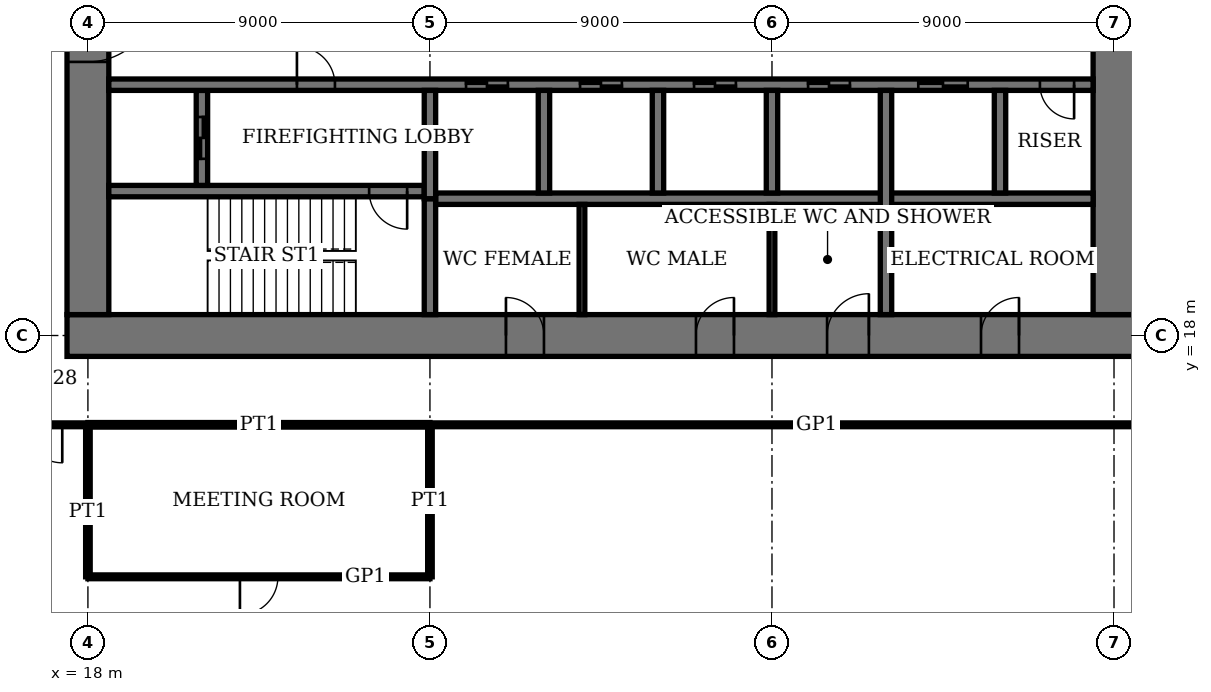
"""IFC4 building model, lengths in metres.
Left out: names, types, materials, properties, quantities, classifications, styles, units other than length and angle.
Written with IfcOpenShell. Run it as: python <this file> out.ifc"""

import sys

from ifc_helpers import new_model, si_unit, direction, frame, frame_2d, origin, place, context, subcontext, project, spatial, rectangle, extrude, element, fill, save


model = new_model("IFC4")
c1 = context("Model", 3, precision=1e-05, world=origin(), true_north=direction((0.0, 1.0)))
c2 = subcontext(c1, "Body", "Model", "MODEL_VIEW")
j1 = project(units=[si_unit("LENGTHUNIT", "METRE"), si_unit("PLANEANGLEUNIT", "RADIAN")], contexts=[c1])
p1 = place(None, origin())
s1 = spatial("IfcSite", under=j1, at=p1, CompositionType="ELEMENT")
p2 = place(p1, origin())
s2 = spatial("IfcBuilding", under=s1, at=p2, CompositionType="ELEMENT")
p3 = place(p2, frame((0.0, 0.0, 39.8)))
s3 = spatial("IfcBuildingStorey", under=s2, at=p3, CompositionType="ELEMENT", Elevation=39.8)
p4 = place(p3, frame((17.45, 18.0, 0.0), z_axis=(0.0, 0.0, 1.0), x_axis=(1.0, 0.0, 0.0)))
e1 = element("IfcWall", 1, at=p4, inside=s3, PredefinedType="SHEAR", context=c2, shape_type="SweptSolid", body=[
    extrude(rectangle(XDim=28.1, YDim=1.1, at=frame_2d((14.05, 0.0))), origin(), (0.0, 0.0, 1.0), 4.0),
])
p5 = place(p4, frame((11.55, 0.0, 0.0)))
e2 = element("IfcOpeningElement", 2, at=p5, cuts=e1, PredefinedType="OPENING", context=c2, shape_type="SweptSolid", body=[
    extrude(rectangle(XDim=1.0, YDim=2.4, at=frame_2d((0.5, 1.2))), frame((0.0, 0.56, 0.0), z_axis=(0.0, -1.0, 0.0), x_axis=(1.0, 0.0, 0.0)), (0.0, 0.0, 1.0), 1.12),
])
p6 = place(p4, frame((16.55, 0.0, 0.0)))
e3 = element("IfcOpeningElement", 3, at=p6, cuts=e1, PredefinedType="OPENING", context=c2, shape_type="SweptSolid", body=[
    extrude(rectangle(XDim=1.0, YDim=2.4, at=frame_2d((0.5, 1.2))), frame((0.0, 0.56, 0.0), z_axis=(0.0, -1.0, 0.0), x_axis=(1.0, 0.0, 0.0)), (0.0, 0.0, 1.0), 1.12),
])
p7 = place(p4, frame((20.0, 0.0, 0.0)))
e4 = element("IfcOpeningElement", 4, at=p7, cuts=e1, PredefinedType="OPENING", context=c2, shape_type="SweptSolid", body=[
    extrude(rectangle(XDim=1.1, YDim=2.4, at=frame_2d((0.55, 1.2))), frame((0.0, 0.56, 0.0), z_axis=(0.0, -1.0, 0.0), x_axis=(1.0, 0.0, 0.0)), (0.0, 0.0, 1.0), 1.12),
])
p8 = place(p4, frame((24.05, 0.0, 0.0)))
e5 = element("IfcOpeningElement", 5, at=p8, cuts=e1, PredefinedType="OPENING", context=c2, shape_type="SweptSolid", body=[
    extrude(rectangle(XDim=1.0, YDim=2.4, at=frame_2d((0.5, 1.2))), frame((0.0, 0.56, 0.0), z_axis=(0.0, -1.0, 0.0), x_axis=(1.0, 0.0, 0.0)), (0.0, 0.0, 1.0), 1.12),
])
p9 = place(p3, frame((18.0, 35.45, 0.0), z_axis=(0.0, 0.0, 1.0), x_axis=(0.0, -1.0, 0.0)))
e6 = element("IfcWall", 6, at=p9, inside=s3, PredefinedType="SHEAR", context=c2, shape_type="SweptSolid", body=[
    extrude(rectangle(XDim=16.9, YDim=1.1, at=frame_2d((8.45, 0.0))), origin(), (0.0, 0.0, 1.0), 4.0),
])
p10 = place(p9, frame((8.45, 0.0, 0.0)))
e7 = element("IfcOpeningElement", 7, at=p10, cuts=e6, PredefinedType="OPENING", context=c2, shape_type="SweptSolid", body=[
    extrude(rectangle(XDim=1.8, YDim=2.4, at=frame_2d((0.9, 1.2))), frame((0.0, 0.56, 0.0), z_axis=(0.0, -1.0, 0.0), x_axis=(1.0, 0.0, 0.0)), (0.0, 0.0, 1.0), 1.12),
])
p11 = place(p3, frame((45.0, 18.55, 0.0), z_axis=(0.0, 0.0, 1.0), x_axis=(0.0, 1.0, 0.0)))
e8 = element("IfcWall", 8, at=p11, inside=s3, PredefinedType="SHEAR", context=c2, shape_type="SweptSolid", body=[
    extrude(rectangle(XDim=16.9, YDim=1.1, at=frame_2d((8.45, 0.0))), origin(), (0.0, 0.0, 1.0), 4.0),
])
p12 = place(p11, frame((8.45, 0.0, 0.0)))
e9 = element("IfcOpeningElement", 9, at=p12, cuts=e8, PredefinedType="OPENING", context=c2, shape_type="SweptSolid", body=[
    extrude(rectangle(XDim=1.8, YDim=2.4, at=frame_2d((0.9, 1.2))), frame((0.0, 0.56, 0.0), z_axis=(0.0, -1.0, 0.0), x_axis=(1.0, 0.0, 0.0)), (0.0, 0.0, 1.0), 1.12),
])
p13 = place(p3, frame((18.55, 21.8, 0.0), z_axis=(0.0, 0.0, 1.0), x_axis=(1.0, 0.0, 0.0)))
e10 = element("IfcWall", 10, at=p13, inside=s3, PredefinedType="SHEAR", context=c2, shape_type="SweptSolid", body=[
    extrude(rectangle(XDim=8.3, YDim=0.3, at=frame_2d((4.15, 0.0))), origin(), (0.0, 0.0, 1.0), 4.0),
])
p14 = place(p13, frame((6.85, 0.0, 0.0)))
e11 = element("IfcOpeningElement", 11, at=p14, cuts=e10, PredefinedType="OPENING", context=c2, shape_type="SweptSolid", body=[
    extrude(rectangle(XDim=1.0, YDim=2.4, at=frame_2d((0.5, 1.2))), frame((0.0, 0.16, 0.0), z_axis=(0.0, -1.0, 0.0), x_axis=(1.0, 0.0, 0.0)), (0.0, 0.0, 1.0), 0.32),
])
p15 = place(p3, frame((27.0, 18.55, 0.0), z_axis=(0.0, 0.0, 1.0), x_axis=(0.0, 1.0, 0.0)))
e12 = element("IfcWall", 12, at=p15, inside=s3, PredefinedType="SHEAR", context=c2, shape_type="SweptSolid", body=[
    extrude(rectangle(XDim=3.05, YDim=0.3, at=frame_2d((1.525, 0.0))), origin(), (0.0, 0.0, 1.0), 4.0),
])
p16 = place(p3, frame((21.0, 21.95, 0.0), z_axis=(0.0, 0.0, 1.0), x_axis=(0.0, 1.0, 0.0)))
e13 = element("IfcWall", 13, at=p16, inside=s3, PredefinedType="SHEAR", context=c2, shape_type="SweptSolid", body=[
    extrude(rectangle(XDim=2.5, YDim=0.3, at=frame_2d((1.25, 0.0))), origin(), (0.0, 0.0, 1.0), 4.0),
])
p17 = place(p16, frame((0.7, 0.0, 0.0)))
e14 = element("IfcOpeningElement", 14, at=p17, cuts=e13, PredefinedType="OPENING", context=c2, shape_type="SweptSolid", body=[
    extrude(rectangle(XDim=1.1, YDim=2.4, at=frame_2d((0.55, 1.2))), frame((0.0, 0.16, 0.0), z_axis=(0.0, -1.0, 0.0), x_axis=(1.0, 0.0, 0.0)), (0.0, 0.0, 1.0), 0.32),
])
p18 = place(p3, frame((18.55, 24.6, 0.0), z_axis=(0.0, 0.0, 1.0), x_axis=(1.0, 0.0, 0.0)))
e15 = element("IfcWall", 15, at=p18, inside=s3, PredefinedType="SHEAR", context=c2, shape_type="SweptSolid", body=[
    extrude(rectangle(XDim=25.9, YDim=0.3, at=frame_2d((12.95, 0.0))), origin(), (0.0, 0.0, 1.0), 4.0),
])
p19 = place(p18, frame((4.95, 0.0, 0.0)))
e16 = element("IfcOpeningElement", 16, at=p19, cuts=e15, PredefinedType="OPENING", context=c2, shape_type="SweptSolid", body=[
    extrude(rectangle(XDim=1.0, YDim=2.4, at=frame_2d((0.5, 1.2))), frame((0.0, 0.16, 0.0), z_axis=(0.0, -1.0, 0.0), x_axis=(1.0, 0.0, 0.0)), (0.0, 0.0, 1.0), 0.32),
])
p20 = place(p18, frame((24.5, 0.0, 0.0)))
e17 = element("IfcOpeningElement", 17, at=p20, cuts=e15, PredefinedType="OPENING", context=c2, shape_type="SweptSolid", body=[
    extrude(rectangle(XDim=0.9, YDim=2.1, at=frame_2d((0.45, 1.05))), frame((0.0, 0.16, 0.0), z_axis=(0.0, -1.0, 0.0), x_axis=(1.0, 0.0, 0.0)), (0.0, 0.0, 1.0), 0.32),
])
p21 = place(p18, frame((9.4, 0.0, 0.0)))
e18 = element("IfcOpeningElement", 18, at=p21, cuts=e15, PredefinedType="OPENING", context=c2, shape_type="SweptSolid", body=[
    extrude(rectangle(XDim=1.1, YDim=2.4, at=frame_2d((0.55, 1.2))), frame((0.0, 0.16, 0.0), z_axis=(0.0, -1.0, 0.0), x_axis=(1.0, 0.0, 0.0)), (0.0, 0.0, 1.0), 0.32),
])
p22 = place(p18, frame((12.4, 0.0, 0.0)))
e19 = element("IfcOpeningElement", 19, at=p22, cuts=e15, PredefinedType="OPENING", context=c2, shape_type="SweptSolid", body=[
    extrude(rectangle(XDim=1.1, YDim=2.4, at=frame_2d((0.55, 1.2))), frame((0.0, 0.16, 0.0), z_axis=(0.0, -1.0, 0.0), x_axis=(1.0, 0.0, 0.0)), (0.0, 0.0, 1.0), 0.32),
])
p23 = place(p18, frame((15.4, 0.0, 0.0)))
e20 = element("IfcOpeningElement", 20, at=p23, cuts=e15, PredefinedType="OPENING", context=c2, shape_type="SweptSolid", body=[
    extrude(rectangle(XDim=1.1, YDim=2.4, at=frame_2d((0.55, 1.2))), frame((0.0, 0.16, 0.0), z_axis=(0.0, -1.0, 0.0), x_axis=(1.0, 0.0, 0.0)), (0.0, 0.0, 1.0), 0.32),
])
p24 = place(p18, frame((18.4, 0.0, 0.0)))
e21 = element("IfcOpeningElement", 21, at=p24, cuts=e15, PredefinedType="OPENING", context=c2, shape_type="SweptSolid", body=[
    extrude(rectangle(XDim=1.1, YDim=2.4, at=frame_2d((0.55, 1.2))), frame((0.0, 0.16, 0.0), z_axis=(0.0, -1.0, 0.0), x_axis=(1.0, 0.0, 0.0)), (0.0, 0.0, 1.0), 0.32),
])
p25 = place(p18, frame((21.3, 0.0, 0.0)))
e22 = element("IfcOpeningElement", 22, at=p25, cuts=e15, PredefinedType="OPENING", context=c2, shape_type="SweptSolid", body=[
    extrude(rectangle(XDim=1.3, YDim=2.4, at=frame_2d((0.65, 1.2))), frame((0.0, 0.16, 0.0), z_axis=(0.0, -1.0, 0.0), x_axis=(1.0, 0.0, 0.0)), (0.0, 0.0, 1.0), 0.32),
])
p26 = place(p3, frame((27.15, 21.6, 0.0), z_axis=(0.0, 0.0, 1.0), x_axis=(1.0, 0.0, 0.0)))
e23 = element("IfcWall", 23, at=p26, inside=s3, PredefinedType="SHEAR", context=c2, shape_type="SweptSolid", body=[
    extrude(rectangle(XDim=17.3, YDim=0.3, at=frame_2d((8.65, 0.0))), origin(), (0.0, 0.0, 1.0), 4.0),
])
for number, where, z_axis, x_axis in (
    (24, (30.0, 21.75, 0.0), (0.0, 0.0, 1.0), (0.0, 1.0, 0.0)),
    (25, (33.0, 21.75, 0.0), (0.0, 0.0, 1.0), (0.0, 1.0, 0.0)),
    (26, (36.0, 21.75, 0.0), (0.0, 0.0, 1.0), (0.0, 1.0, 0.0)),
):
    element("IfcWall", number, at=place(p3, frame(where, z_axis=z_axis, x_axis=x_axis)), inside=s3, PredefinedType="SHEAR", context=c2, shape_type="SweptSolid", body=[
        extrude(rectangle(XDim=2.7, YDim=0.3, at=frame_2d((1.35, 0.0))), origin(), (0.0, 0.0, 1.0), 4.0),
    ])
p27 = place(p3, frame((39.0, 18.55, 0.0), z_axis=(0.0, 0.0, 1.0), x_axis=(0.0, 1.0, 0.0)))
e27 = element("IfcWall", 27, at=p27, inside=s3, PredefinedType="SHEAR", context=c2, shape_type="SweptSolid", body=[
    extrude(rectangle(XDim=5.9, YDim=0.3, at=frame_2d((2.95, 0.0))), origin(), (0.0, 0.0, 1.0), 4.0),
])
p28 = place(p3, frame((42.0, 21.75, 0.0), z_axis=(0.0, 0.0, 1.0), x_axis=(0.0, 1.0, 0.0)))
e28 = element("IfcWall", 28, at=p28, inside=s3, PredefinedType="SHEAR", context=c2, shape_type="SweptSolid", body=[
    extrude(rectangle(XDim=2.7, YDim=0.3, at=frame_2d((1.35, 0.0))), origin(), (0.0, 0.0, 1.0), 4.0),
])
p29 = place(p3, frame((27.0, 21.6, 0.0), z_axis=(0.0, 0.0, 1.0), x_axis=(0.0, 1.0, 0.0)))
e29 = element("IfcWall", 29, at=p29, inside=s3, PredefinedType="SHEAR", context=c2, shape_type="SweptSolid", body=[
    extrude(rectangle(XDim=2.85, YDim=0.3, at=frame_2d((1.425, 0.0))), origin(), (0.0, 0.0, 1.0), 4.0),
])
p30 = place(p3, frame((18.0, 11.65, 0.0), z_axis=(0.0, 0.0, 1.0), x_axis=(1.0, 0.0, 0.0)))
e30 = element("IfcWall", 30, at=p30, inside=s3, PredefinedType="PARTITIONING", context=c2, shape_type="SweptSolid", body=[
    extrude(rectangle(XDim=9.0, YDim=0.1, at=frame_2d((4.5, 0.0))), origin(), (0.0, 0.0, 1.0), 3.75),
])
p31 = place(p30, frame((4.0, 0.0, 0.0)))
e31 = element("IfcOpeningElement", 31, at=p31, cuts=e30, PredefinedType="OPENING", context=c2, shape_type="SweptSolid", body=[
    extrude(rectangle(XDim=1.0, YDim=2.4, at=frame_2d((0.5, 1.2))), frame((0.0, 0.06, 0.0), z_axis=(0.0, -1.0, 0.0), x_axis=(1.0, 0.0, 0.0)), (0.0, 0.0, 1.0), 0.12),
])
p32 = place(p3, frame((18.0, 15.65, 0.0), z_axis=(0.0, 0.0, 1.0), x_axis=(1.0, 0.0, 0.0)))
e32 = element("IfcWall", 32, at=p32, inside=s3, PredefinedType="PARTITIONING", context=c2, shape_type="SweptSolid", body=[
    extrude(rectangle(XDim=9.0, YDim=0.12, at=frame_2d((4.5, 0.0))), origin(), (0.0, 0.0, 1.0), 3.75),
])
p33 = place(p3, frame((15.65, 15.65, 0.0), z_axis=(0.0, 0.0, 1.0), x_axis=(1.0, 0.0, 0.0)))
e33 = element("IfcWall", 33, at=p33, inside=s3, PredefinedType="PARTITIONING", context=c2, shape_type="SweptSolid", body=[
    extrude(rectangle(XDim=2.35, YDim=0.1, at=frame_2d((1.175, 0.0))), origin(), (0.0, 0.0, 1.0), 3.75),
])
p34 = place(p33, frame((0.675, 0.0, 0.0)))
e34 = element("IfcOpeningElement", 34, at=p34, cuts=e33, PredefinedType="OPENING", context=c2, shape_type="SweptSolid", body=[
    extrude(rectangle(XDim=1.0, YDim=2.4, at=frame_2d((0.5, 1.2))), frame((0.0, 0.06, 0.0), z_axis=(0.0, -1.0, 0.0), x_axis=(1.0, 0.0, 0.0)), (0.0, 0.0, 1.0), 0.12),
])
p35 = place(p3, frame((27.0, 15.65, 0.0), z_axis=(0.0, 0.0, 1.0), x_axis=(1.0, 0.0, 0.0)))
e35 = element("IfcWall", 35, at=p35, inside=s3, PredefinedType="PARTITIONING", context=c2, shape_type="SweptSolid", body=[
    extrude(rectangle(XDim=20.35, YDim=0.1, at=frame_2d((10.175, 0.0))), origin(), (0.0, 0.0, 1.0), 3.75),
])
for number, where, z_axis, x_axis in (
    (36, (18.0, 11.65, 0.0), (0.0, 0.0, 1.0), (0.0, 1.0, 0.0)),
    (37, (27.0, 11.65, 0.0), (0.0, 0.0, 1.0), (0.0, 1.0, 0.0)),
):
    element("IfcWall", number, at=place(p3, frame(where, z_axis=z_axis, x_axis=x_axis)), inside=s3, PredefinedType="PARTITIONING", context=c2, shape_type="SweptSolid", body=[
        extrude(rectangle(XDim=4.0, YDim=0.12, at=frame_2d((2.0, 0.0))), origin(), (0.0, 0.0, 1.0), 3.05),
    ])
for number, where, z_axis, x_axis in (
    (38, (31.0, 18.55, 0.0), (0.0, 0.0, 1.0), (0.0, 1.0, 0.0)),
    (39, (36.0, 18.55, 0.0), (0.0, 0.0, 1.0), (0.0, 1.0, 0.0)),
):
    element("IfcWall", number, at=place(p3, frame(where, z_axis=z_axis, x_axis=x_axis)), inside=s3, PredefinedType="PARTITIONING", context=c2, shape_type="SweptSolid", body=[
        extrude(rectangle(XDim=2.9, YDim=0.15, at=frame_2d((1.45, 0.0))), origin(), (0.0, 0.0, 1.0), 3.75),
    ])
p36 = place(p10, origin())
e40 = element("IfcDoor", 40, at=p36, inside=s3, OperationType="DOUBLE_DOOR_DOUBLE_SWING", PredefinedType="DOOR", context=c2, shape_type="SweptSolid", body=[
    extrude(rectangle(XDim=1.8, YDim=2.4, at=frame_2d((0.9, 1.2))), frame((0.0, 0.03, 0.0), z_axis=(0.0, -1.0, 0.0), x_axis=(1.0, 0.0, 0.0)), (0.0, 0.0, 1.0), 0.06),
    extrude(rectangle(XDim=0.04, YDim=2.4, at=frame_2d((0.02, 1.2))), frame((0.0, 0.55, 0.0), z_axis=(0.0, -1.0, 0.0), x_axis=(1.0, 0.0, 0.0)), (0.0, 0.0, 1.0), 1.1),
    extrude(rectangle(XDim=0.04, YDim=2.4, at=frame_2d((1.78, 1.2))), frame((0.0, 0.55, 0.0), z_axis=(0.0, -1.0, 0.0), x_axis=(1.0, 0.0, 0.0)), (0.0, 0.0, 1.0), 1.1),
    extrude(rectangle(XDim=1.8, YDim=0.04, at=frame_2d((0.9, 2.38))), frame((0.0, 0.55, 0.0), z_axis=(0.0, -1.0, 0.0), x_axis=(1.0, 0.0, 0.0)), (0.0, 0.0, 1.0), 1.1),
])
fill(e7, e40)
p37 = place(p5, origin())
e41 = element("IfcDoor", 41, at=p37, inside=s3, OperationType="SINGLE_SWING_RIGHT", PredefinedType="DOOR", context=c2, shape_type="SweptSolid", body=[
    extrude(rectangle(XDim=1.0, YDim=2.4, at=frame_2d((0.5, 1.2))), frame((0.0, 0.025, 0.0), z_axis=(0.0, -1.0, 0.0), x_axis=(1.0, 0.0, 0.0)), (0.0, 0.0, 1.0), 0.05),
    extrude(rectangle(XDim=0.04, YDim=2.4, at=frame_2d((0.02, 1.2))), frame((0.0, 0.4, 0.0), z_axis=(0.0, -1.0, 0.0), x_axis=(1.0, 0.0, 0.0)), (0.0, 0.0, 1.0), 0.8),
    extrude(rectangle(XDim=0.04, YDim=2.4, at=frame_2d((0.98, 1.2))), frame((0.0, 0.4, 0.0), z_axis=(0.0, -1.0, 0.0), x_axis=(1.0, 0.0, 0.0)), (0.0, 0.0, 1.0), 0.8),
    extrude(rectangle(XDim=1.0, YDim=0.04, at=frame_2d((0.5, 2.38))), frame((0.0, 0.4, 0.0), z_axis=(0.0, -1.0, 0.0), x_axis=(1.0, 0.0, 0.0)), (0.0, 0.0, 1.0), 0.8),
])
fill(e2, e41)
p38 = place(p6, origin())
e42 = element("IfcDoor", 42, at=p38, inside=s3, OperationType="SINGLE_SWING_LEFT", PredefinedType="DOOR", context=c2, shape_type="SweptSolid", body=[
    extrude(rectangle(XDim=1.0, YDim=2.4, at=frame_2d((0.5, 1.2))), frame((0.0, 0.025, 0.0), z_axis=(0.0, -1.0, 0.0), x_axis=(1.0, 0.0, 0.0)), (0.0, 0.0, 1.0), 0.05),
    extrude(rectangle(XDim=0.04, YDim=2.4, at=frame_2d((0.02, 1.2))), frame((0.0, 0.4, 0.0), z_axis=(0.0, -1.0, 0.0), x_axis=(1.0, 0.0, 0.0)), (0.0, 0.0, 1.0), 0.8),
    extrude(rectangle(XDim=0.04, YDim=2.4, at=frame_2d((0.98, 1.2))), frame((0.0, 0.4, 0.0), z_axis=(0.0, -1.0, 0.0), x_axis=(1.0, 0.0, 0.0)), (0.0, 0.0, 1.0), 0.8),
    extrude(rectangle(XDim=1.0, YDim=0.04, at=frame_2d((0.5, 2.38))), frame((0.0, 0.4, 0.0), z_axis=(0.0, -1.0, 0.0), x_axis=(1.0, 0.0, 0.0)), (0.0, 0.0, 1.0), 0.8),
])
fill(e3, e42)
p39 = place(p7, origin())
e43 = element("IfcDoor", 43, at=p39, inside=s3, OperationType="SINGLE_SWING_LEFT", PredefinedType="DOOR", context=c2, shape_type="SweptSolid", body=[
    extrude(rectangle(XDim=1.1, YDim=2.4, at=frame_2d((0.55, 1.2))), frame((0.0, 0.025, 0.0), z_axis=(0.0, -1.0, 0.0), x_axis=(1.0, 0.0, 0.0)), (0.0, 0.0, 1.0), 0.05),
    extrude(rectangle(XDim=0.04, YDim=2.4, at=frame_2d((0.02, 1.2))), frame((0.0, 0.44, 0.0), z_axis=(0.0, -1.0, 0.0), x_axis=(1.0, 0.0, 0.0)), (0.0, 0.0, 1.0), 0.88),
    extrude(rectangle(XDim=0.04, YDim=2.4, at=frame_2d((1.08, 1.2))), frame((0.0, 0.44, 0.0), z_axis=(0.0, -1.0, 0.0), x_axis=(1.0, 0.0, 0.0)), (0.0, 0.0, 1.0), 0.88),
    extrude(rectangle(XDim=1.1, YDim=0.04, at=frame_2d((0.55, 2.38))), frame((0.0, 0.44, 0.0), z_axis=(0.0, -1.0, 0.0), x_axis=(1.0, 0.0, 0.0)), (0.0, 0.0, 1.0), 0.88),
])
fill(e4, e43)
p40 = place(p8, origin())
e44 = element("IfcDoor", 44, at=p40, inside=s3, OperationType="SINGLE_SWING_LEFT", PredefinedType="DOOR", context=c2, shape_type="SweptSolid", body=[
    extrude(rectangle(XDim=1.0, YDim=2.4, at=frame_2d((0.5, 1.2))), frame((0.0, 0.025, 0.0), z_axis=(0.0, -1.0, 0.0), x_axis=(1.0, 0.0, 0.0)), (0.0, 0.0, 1.0), 0.05),
    extrude(rectangle(XDim=0.04, YDim=2.4, at=frame_2d((0.02, 1.2))), frame((0.0, 0.4, 0.0), z_axis=(0.0, -1.0, 0.0), x_axis=(1.0, 0.0, 0.0)), (0.0, 0.0, 1.0), 0.8),
    extrude(rectangle(XDim=0.04, YDim=2.4, at=frame_2d((0.98, 1.2))), frame((0.0, 0.4, 0.0), z_axis=(0.0, -1.0, 0.0), x_axis=(1.0, 0.0, 0.0)), (0.0, 0.0, 1.0), 0.8),
    extrude(rectangle(XDim=1.0, YDim=0.04, at=frame_2d((0.5, 2.38))), frame((0.0, 0.4, 0.0), z_axis=(0.0, -1.0, 0.0), x_axis=(1.0, 0.0, 0.0)), (0.0, 0.0, 1.0), 0.8),
])
fill(e5, e44)
p41 = place(p14, origin())
e45 = element("IfcDoor", 45, at=p41, inside=s3, OperationType="SINGLE_SWING_RIGHT", PredefinedType="DOOR", context=c2, shape_type="SweptSolid", body=[
    extrude(rectangle(XDim=1.0, YDim=2.4, at=frame_2d((0.5, 1.2))), frame((0.0, 0.03, 0.0), z_axis=(0.0, -1.0, 0.0), x_axis=(1.0, 0.0, 0.0)), (0.0, 0.0, 1.0), 0.06),
])
fill(e11, e45)
p42 = place(p19, origin())
e46 = element("IfcDoor", 46, at=p42, inside=s3, OperationType="SINGLE_SWING_RIGHT", PredefinedType="DOOR", context=c2, shape_type="SweptSolid", body=[
    extrude(rectangle(XDim=1.0, YDim=2.4, at=frame_2d((0.5, 1.2))), frame((0.0, 0.03, 0.0), z_axis=(0.0, -1.0, 0.0), x_axis=(1.0, 0.0, 0.0)), (0.0, 0.0, 1.0), 0.06),
])
fill(e16, e46)
p43 = place(p20, origin())
e47 = element("IfcDoor", 47, at=p43, inside=s3, OperationType="SINGLE_SWING_RIGHT", PredefinedType="DOOR", context=c2, shape_type="SweptSolid", body=[
    extrude(rectangle(XDim=0.9, YDim=2.1, at=frame_2d((0.45, 1.05))), frame((0.0, 0.03, 0.0), z_axis=(0.0, -1.0, 0.0), x_axis=(1.0, 0.0, 0.0)), (0.0, 0.0, 1.0), 0.06),
])
fill(e17, e47)
p44 = place(p31, origin())
e48 = element("IfcDoor", 48, at=p44, inside=s3, OperationType="SINGLE_SWING_LEFT", PredefinedType="DOOR", context=c2, shape_type="SweptSolid", body=[
    extrude(rectangle(XDim=1.0, YDim=2.4, at=frame_2d((0.5, 1.2))), frame((0.0, 0.02, 0.0), z_axis=(0.0, -1.0, 0.0), x_axis=(1.0, 0.0, 0.0)), (0.0, 0.0, 1.0), 0.04),
])
fill(e31, e48)
p45 = place(p34, origin())
e49 = element("IfcDoor", 49, at=p45, inside=s3, OperationType="SINGLE_SWING_RIGHT", PredefinedType="DOOR", context=c2, shape_type="SweptSolid", body=[
    extrude(rectangle(XDim=1.0, YDim=2.4, at=frame_2d((0.5, 1.2))), frame((0.0, 0.02, 0.0), z_axis=(0.0, -1.0, 0.0), x_axis=(1.0, 0.0, 0.0)), (0.0, 0.0, 1.0), 0.04),
])
fill(e34, e49)
p46 = place(p21, origin())
e50 = element("IfcDoor", 50, at=p46, inside=s3, OperationType="DOUBLE_DOOR_SLIDING", PredefinedType="DOOR", context=c2, shape_type="SweptSolid", body=[
    extrude(rectangle(XDim=1.1, YDim=2.4, at=frame_2d((0.55, 1.2))), frame((0.0, 0.02, 0.0), z_axis=(0.0, -1.0, 0.0), x_axis=(1.0, 0.0, 0.0)), (0.0, 0.0, 1.0), 0.04),
])
fill(e18, e50)
p47 = place(p22, origin())
e51 = element("IfcDoor", 51, at=p47, inside=s3, OperationType="DOUBLE_DOOR_SLIDING", PredefinedType="DOOR", context=c2, shape_type="SweptSolid", body=[
    extrude(rectangle(XDim=1.1, YDim=2.4, at=frame_2d((0.55, 1.2))), frame((0.0, 0.02, 0.0), z_axis=(0.0, -1.0, 0.0), x_axis=(1.0, 0.0, 0.0)), (0.0, 0.0, 1.0), 0.04),
])
fill(e19, e51)
p48 = place(p23, origin())
e52 = element("IfcDoor", 52, at=p48, inside=s3, OperationType="DOUBLE_DOOR_SLIDING", PredefinedType="DOOR", context=c2, shape_type="SweptSolid", body=[
    extrude(rectangle(XDim=1.1, YDim=2.4, at=frame_2d((0.55, 1.2))), frame((0.0, 0.02, 0.0), z_axis=(0.0, -1.0, 0.0), x_axis=(1.0, 0.0, 0.0)), (0.0, 0.0, 1.0), 0.04),
])
fill(e20, e52)
p49 = place(p24, origin())
e53 = element("IfcDoor", 53, at=p49, inside=s3, OperationType="DOUBLE_DOOR_SLIDING", PredefinedType="DOOR", context=c2, shape_type="SweptSolid", body=[
    extrude(rectangle(XDim=1.1, YDim=2.4, at=frame_2d((0.55, 1.2))), frame((0.0, 0.02, 0.0), z_axis=(0.0, -1.0, 0.0), x_axis=(1.0, 0.0, 0.0)), (0.0, 0.0, 1.0), 0.04),
])
fill(e21, e53)
p50 = place(p25, origin())
e54 = element("IfcDoor", 54, at=p50, inside=s3, OperationType="DOUBLE_DOOR_SLIDING", PredefinedType="DOOR", context=c2, shape_type="SweptSolid", body=[
    extrude(rectangle(XDim=1.3, YDim=2.4, at=frame_2d((0.65, 1.2))), frame((0.0, 0.02, 0.0), z_axis=(0.0, -1.0, 0.0), x_axis=(1.0, 0.0, 0.0)), (0.0, 0.0, 1.0), 0.04),
])
fill(e22, e54)
p51 = place(p17, origin())
e55 = element("IfcDoor", 55, at=p51, inside=s3, OperationType="DOUBLE_DOOR_SLIDING", PredefinedType="DOOR", context=c2, shape_type="SweptSolid", body=[
    extrude(rectangle(XDim=1.1, YDim=2.4, at=frame_2d((0.55, 1.2))), frame((0.0, 0.03, 0.0), z_axis=(0.0, -1.0, 0.0), x_axis=(1.0, 0.0, 0.0)), (0.0, 0.0, 1.0), 0.06),
])
fill(e14, e55)
save(model, sys.argv[1])
